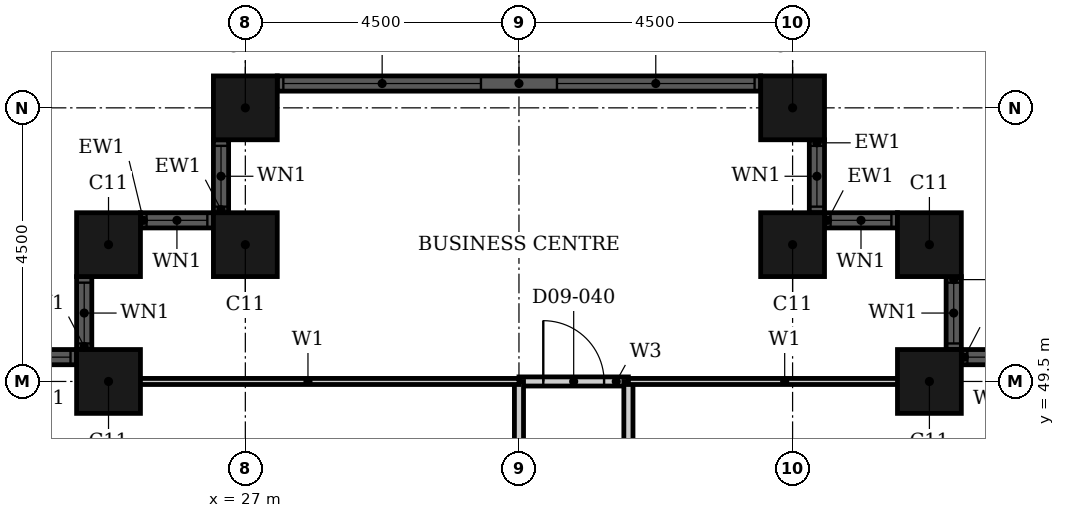
"""IFC4 building model, lengths in metres.
Left out: names, types, materials, properties, quantities, classifications, styles, units other than length and angle.
Written with IfcOpenShell. Run it as: python <this file> out.ifc"""

import sys

from ifc_helpers import new_model, si_unit, direction, frame, frame_2d, origin, origin_2d, place, context, subcontext, project, spatial, rectangle, hollow_rectangle, extrude, element, fill, save


model = new_model("IFC4")
c1 = context("Model", 3, precision=1e-05, world=origin(), true_north=direction((0.0, 1.0)))
c2 = subcontext(c1, "Body", "Model", "MODEL_VIEW")
j1 = project(units=[si_unit("LENGTHUNIT", "METRE"), si_unit("PLANEANGLEUNIT", "RADIAN")], contexts=[c1])
p1 = place(None, origin())
s1 = spatial("IfcSite", under=j1, at=p1, CompositionType="ELEMENT")
p2 = place(p1, origin())
s2 = spatial("IfcBuilding", under=s1, at=p2, CompositionType="ELEMENT")
p3 = place(p2, frame((0.0, 0.0, 44.4)))
s3 = spatial("IfcBuildingStorey", under=s2, at=p3, CompositionType="ELEMENT", Elevation=44.4)
for number, where, z_axis, x_axis in (
    (1, (38.25, 49.5, 0.0), (0.0, 0.0, 1.0), (1.0, 0.0, 0.0)),
    (2, (38.25, 51.75, 0.0), (0.0, 0.0, 1.0), (1.0, 0.0, 0.0)),
    (3, (36.0, 51.75, 0.0), (0.0, 0.0, 1.0), (1.0, 0.0, 0.0)),
    (4, (36.0, 54.0, 0.0), (0.0, 0.0, 1.0), (1.0, 0.0, 0.0)),
    (5, (27.0, 54.0, 0.0), (0.0, 0.0, 1.0), (1.0, 0.0, 0.0)),
    (6, (27.0, 51.75, 0.0), (0.0, 0.0, 1.0), (1.0, 0.0, 0.0)),
    (7, (24.75, 51.75, 0.0), (0.0, 0.0, 1.0), (1.0, 0.0, 0.0)),
    (8, (24.75, 49.5, 0.0), (0.0, 0.0, 1.0), (1.0, 0.0, 0.0)),
):
    element("IfcColumn", number, at=place(p3, frame(where, z_axis=z_axis, x_axis=x_axis)), inside=s3, PredefinedType="COLUMN", context=c2, shape_type="SweptSolid", body=[
        extrude(hollow_rectangle(XDim=1.05, YDim=1.05, WallThickness=0.034, at=origin_2d()), origin(), (0.0, 0.0, 1.0), 3.6),
    ])
p4 = place(p3, frame((39.975, 49.9, 0.0), z_axis=(0.0, 0.0, 1.0), x_axis=(-1.0, 0.0, 0.0)))
e9 = element("IfcWall", 9, at=p4, inside=s3, PredefinedType="SOLIDWALL", context=c2, shape_type="SweptSolid", body=[
    extrude(rectangle(XDim=1.2, YDim=0.25, at=frame_2d((0.6, 0.0))), origin(), (0.0, 0.0, 1.0), 3.6),
])
p5 = place(p4, frame((0.1, 0.0, 0.9)))
e10 = element("IfcOpeningElement", 10, at=p5, cuts=e9, PredefinedType="OPENING", context=c2, shape_type="SweptSolid", body=[
    extrude(rectangle(XDim=1.0, YDim=2.08, at=frame_2d((0.5, 1.04))), frame((0.0, 0.135, 0.0), z_axis=(0.0, -1.0, 0.0), x_axis=(1.0, 0.0, 0.0)), (0.0, 0.0, 1.0), 0.27),
])
p6 = place(p3, frame((38.65, 50.025, 0.0), z_axis=(0.0, 0.0, 1.0), x_axis=(0.0, 1.0, 0.0)))
e11 = element("IfcWall", 11, at=p6, inside=s3, PredefinedType="SOLIDWALL", context=c2, shape_type="SweptSolid", body=[
    extrude(rectangle(XDim=1.2, YDim=0.25, at=frame_2d((0.6, 0.0))), origin(), (0.0, 0.0, 1.0), 3.6),
])
p7 = place(p6, frame((0.1, 0.0, 0.9)))
e12 = element("IfcOpeningElement", 12, at=p7, cuts=e11, PredefinedType="OPENING", context=c2, shape_type="SweptSolid", body=[
    extrude(rectangle(XDim=1.0, YDim=2.08, at=frame_2d((0.5, 1.04))), frame((0.0, 0.135, 0.0), z_axis=(0.0, -1.0, 0.0), x_axis=(1.0, 0.0, 0.0)), (0.0, 0.0, 1.0), 0.27),
])
p8 = place(p3, frame((37.725, 52.15, 0.0), z_axis=(0.0, 0.0, 1.0), x_axis=(-1.0, 0.0, 0.0)))
e13 = element("IfcWall", 13, at=p8, inside=s3, PredefinedType="SOLIDWALL", context=c2, shape_type="SweptSolid", body=[
    extrude(rectangle(XDim=1.2, YDim=0.25, at=frame_2d((0.6, 0.0))), origin(), (0.0, 0.0, 1.0), 3.6),
])
p9 = place(p8, frame((0.1, 0.0, 0.9)))
e14 = element("IfcOpeningElement", 14, at=p9, cuts=e13, PredefinedType="OPENING", context=c2, shape_type="SweptSolid", body=[
    extrude(rectangle(XDim=1.0, YDim=2.08, at=frame_2d((0.5, 1.04))), frame((0.0, 0.135, 0.0), z_axis=(0.0, -1.0, 0.0), x_axis=(1.0, 0.0, 0.0)), (0.0, 0.0, 1.0), 0.27),
])
p10 = place(p3, frame((36.4, 52.275, 0.0), z_axis=(0.0, 0.0, 1.0), x_axis=(0.0, 1.0, 0.0)))
e15 = element("IfcWall", 15, at=p10, inside=s3, PredefinedType="SOLIDWALL", context=c2, shape_type="SweptSolid", body=[
    extrude(rectangle(XDim=1.2, YDim=0.25, at=frame_2d((0.6, 0.0))), origin(), (0.0, 0.0, 1.0), 3.6),
])
p11 = place(p10, frame((0.1, 0.0, 0.9)))
e16 = element("IfcOpeningElement", 16, at=p11, cuts=e15, PredefinedType="OPENING", context=c2, shape_type="SweptSolid", body=[
    extrude(rectangle(XDim=1.0, YDim=2.08, at=frame_2d((0.5, 1.04))), frame((0.0, 0.135, 0.0), z_axis=(0.0, -1.0, 0.0), x_axis=(1.0, 0.0, 0.0)), (0.0, 0.0, 1.0), 0.27),
])
p12 = place(p3, frame((35.475, 54.4, 0.0), z_axis=(0.0, 0.0, 1.0), x_axis=(-1.0, 0.0, 0.0)))
e17 = element("IfcWall", 17, at=p12, inside=s3, PredefinedType="SOLIDWALL", context=c2, shape_type="SweptSolid", body=[
    extrude(rectangle(XDim=7.95, YDim=0.25, at=frame_2d((3.975, 0.0))), origin(), (0.0, 0.0, 1.0), 3.6),
])
p13 = place(p12, frame((0.1, 0.0, 0.9)))
e18 = element("IfcOpeningElement", 18, at=p13, cuts=e17, PredefinedType="OPENING", context=c2, shape_type="SweptSolid", body=[
    extrude(rectangle(XDim=3.25, YDim=2.08, at=frame_2d((1.625, 1.04))), frame((0.0, 0.135, 0.0), z_axis=(0.0, -1.0, 0.0), x_axis=(1.0, 0.0, 0.0)), (0.0, 0.0, 1.0), 0.27),
])
p14 = place(p12, frame((4.6, 0.0, 0.9)))
e19 = element("IfcOpeningElement", 19, at=p14, cuts=e17, PredefinedType="OPENING", context=c2, shape_type="SweptSolid", body=[
    extrude(rectangle(XDim=3.25, YDim=2.08, at=frame_2d((1.625, 1.04))), frame((0.0, 0.135, 0.0), z_axis=(0.0, -1.0, 0.0), x_axis=(1.0, 0.0, 0.0)), (0.0, 0.0, 1.0), 0.27),
])
p15 = place(p3, frame((26.6, 53.475, 0.0), z_axis=(0.0, 0.0, 1.0), x_axis=(0.0, -1.0, 0.0)))
e20 = element("IfcWall", 20, at=p15, inside=s3, PredefinedType="SOLIDWALL", context=c2, shape_type="SweptSolid", body=[
    extrude(rectangle(XDim=1.2, YDim=0.25, at=frame_2d((0.6, 0.0))), origin(), (0.0, 0.0, 1.0), 3.6),
])
p16 = place(p15, frame((0.1, 0.0, 0.9)))
e21 = element("IfcOpeningElement", 21, at=p16, cuts=e20, PredefinedType="OPENING", context=c2, shape_type="SweptSolid", body=[
    extrude(rectangle(XDim=1.0, YDim=2.08, at=frame_2d((0.5, 1.04))), frame((0.0, 0.135, 0.0), z_axis=(0.0, -1.0, 0.0), x_axis=(1.0, 0.0, 0.0)), (0.0, 0.0, 1.0), 0.27),
])
p17 = place(p3, frame((26.475, 52.15, 0.0), z_axis=(0.0, 0.0, 1.0), x_axis=(-1.0, 0.0, 0.0)))
e22 = element("IfcWall", 22, at=p17, inside=s3, PredefinedType="SOLIDWALL", context=c2, shape_type="SweptSolid", body=[
    extrude(rectangle(XDim=1.2, YDim=0.25, at=frame_2d((0.6, 0.0))), origin(), (0.0, 0.0, 1.0), 3.6),
])
p18 = place(p17, frame((0.1, 0.0, 0.9)))
e23 = element("IfcOpeningElement", 23, at=p18, cuts=e22, PredefinedType="OPENING", context=c2, shape_type="SweptSolid", body=[
    extrude(rectangle(XDim=1.0, YDim=2.08, at=frame_2d((0.5, 1.04))), frame((0.0, 0.135, 0.0), z_axis=(0.0, -1.0, 0.0), x_axis=(1.0, 0.0, 0.0)), (0.0, 0.0, 1.0), 0.27),
])
p19 = place(p3, frame((24.35, 51.225, 0.0), z_axis=(0.0, 0.0, 1.0), x_axis=(0.0, -1.0, 0.0)))
e24 = element("IfcWall", 24, at=p19, inside=s3, PredefinedType="SOLIDWALL", context=c2, shape_type="SweptSolid", body=[
    extrude(rectangle(XDim=1.2, YDim=0.25, at=frame_2d((0.6, 0.0))), origin(), (0.0, 0.0, 1.0), 3.6),
])
p20 = place(p19, frame((0.1, 0.0, 0.9)))
e25 = element("IfcOpeningElement", 25, at=p20, cuts=e24, PredefinedType="OPENING", context=c2, shape_type="SweptSolid", body=[
    extrude(rectangle(XDim=1.0, YDim=2.08, at=frame_2d((0.5, 1.04))), frame((0.0, 0.135, 0.0), z_axis=(0.0, -1.0, 0.0), x_axis=(1.0, 0.0, 0.0)), (0.0, 0.0, 1.0), 0.27),
])
p21 = place(p3, frame((24.225, 49.9, 0.0), z_axis=(0.0, 0.0, 1.0), x_axis=(-1.0, 0.0, 0.0)))
e26 = element("IfcWall", 26, at=p21, inside=s3, PredefinedType="SOLIDWALL", context=c2, shape_type="SweptSolid", body=[
    extrude(rectangle(XDim=1.2, YDim=0.25, at=frame_2d((0.6, 0.0))), origin(), (0.0, 0.0, 1.0), 3.6),
])
p22 = place(p21, frame((0.1, 0.0, 0.9)))
e27 = element("IfcOpeningElement", 27, at=p22, cuts=e26, PredefinedType="OPENING", context=c2, shape_type="SweptSolid", body=[
    extrude(rectangle(XDim=1.0, YDim=2.08, at=frame_2d((0.5, 1.04))), frame((0.0, 0.135, 0.0), z_axis=(0.0, -1.0, 0.0), x_axis=(1.0, 0.0, 0.0)), (0.0, 0.0, 1.0), 0.27),
])
p23 = place(p3, frame((31.5, 49.5, 0.0), z_axis=(0.0, 0.0, 1.0), x_axis=(1.0, 0.0, 0.0)))
e28 = element("IfcWall", 28, at=p23, inside=s3, PredefinedType="PARTITIONING", context=c2, shape_type="SweptSolid", body=[
    extrude(rectangle(XDim=1.8, YDim=0.15, at=frame_2d((0.9, 0.0))), origin(), (0.0, 0.0, 1.0), 3.2),
])
p24 = place(p23, frame((0.4, 0.0, 0.0)))
e29 = element("IfcOpeningElement", 29, at=p24, cuts=e28, PredefinedType="OPENING", context=c2, shape_type="SweptSolid", body=[
    extrude(rectangle(XDim=1.0, YDim=2.1, at=frame_2d((0.5, 1.05))), frame((0.0, 0.085, 0.0), z_axis=(0.0, -1.0, 0.0), x_axis=(1.0, 0.0, 0.0)), (0.0, 0.0, 1.0), 0.17),
])
p25 = place(p3, frame((31.5, 33.3, 0.0), z_axis=(0.0, 0.0, 1.0), x_axis=(0.0, 1.0, 0.0)))
e30 = element("IfcWall", 30, at=p25, inside=s3, PredefinedType="PARTITIONING", context=c2, shape_type="SweptSolid", body=[
    extrude(rectangle(XDim=16.2, YDim=0.15, at=frame_2d((8.1, 0.0))), origin(), (0.0, 0.0, 1.0), 2.48),
])
p26 = place(p25, frame((8.95, 0.0, 0.0)))
e31 = element("IfcOpeningElement", 31, at=p26, cuts=e30, PredefinedType="OPENING", context=c2, shape_type="SweptSolid", body=[
    extrude(rectangle(XDim=1.0, YDim=2.1, at=frame_2d((0.5, 1.05))), frame((0.0, 0.085, 0.0), z_axis=(0.0, -1.0, 0.0), x_axis=(1.0, 0.0, 0.0)), (0.0, 0.0, 1.0), 0.17),
])
p27 = place(p3, frame((33.3, 33.3, 0.0), z_axis=(0.0, 0.0, 1.0), x_axis=(0.0, 1.0, 0.0)))
e32 = element("IfcWall", 32, at=p27, inside=s3, PredefinedType="PARTITIONING", context=c2, shape_type="SweptSolid", body=[
    extrude(rectangle(XDim=16.2, YDim=0.15, at=frame_2d((8.1, 0.0))), origin(), (0.0, 0.0, 1.0), 3.2),
])
p28 = place(p27, frame((8.95, 0.0, 0.0)))
e33 = element("IfcOpeningElement", 33, at=p28, cuts=e32, PredefinedType="OPENING", context=c2, shape_type="SweptSolid", body=[
    extrude(rectangle(XDim=1.0, YDim=2.1, at=frame_2d((0.5, 1.05))), frame((0.0, 0.085, 0.0), z_axis=(0.0, -1.0, 0.0), x_axis=(1.0, 0.0, 0.0)), (0.0, 0.0, 1.0), 0.17),
])
p29 = place(p3, frame((33.3, 49.5, 0.0), z_axis=(0.0, 0.0, 1.0), x_axis=(1.0, 0.0, 0.0)))
e34 = element("IfcWall", 34, at=p29, inside=s3, PredefinedType="PARTITIONING", context=c2, shape_type="SweptSolid", body=[
    extrude(rectangle(XDim=5.14, YDim=0.1, at=frame_2d((2.57, 0.0))), origin(), (0.0, 0.0, 1.0), 3.2),
])
p30 = place(p3, frame((24.56, 49.5, 0.0), z_axis=(0.0, 0.0, 1.0), x_axis=(1.0, 0.0, 0.0)))
e35 = element("IfcWall", 35, at=p30, inside=s3, PredefinedType="PARTITIONING", context=c2, shape_type="SweptSolid", body=[
    extrude(rectangle(XDim=6.94, YDim=0.1, at=frame_2d((3.47, 0.0))), origin(), (0.0, 0.0, 1.0), 3.2),
])
p31 = place(p5, origin())
e36 = element("IfcWindow", 36, at=p31, inside=s3, PartitioningType="SINGLE_PANEL", PredefinedType="WINDOW", context=c2, shape_type="SweptSolid", body=[
    extrude(rectangle(XDim=1.0, YDim=2.08, at=frame_2d((0.5, 1.04))), frame((0.0, 0.03, 0.0), z_axis=(0.0, -1.0, 0.0), x_axis=(1.0, 0.0, 0.0)), (0.0, 0.0, 1.0), 0.06),
])
fill(e10, e36)
p32 = place(p7, origin())
e37 = element("IfcWindow", 37, at=p32, inside=s3, PartitioningType="SINGLE_PANEL", PredefinedType="WINDOW", context=c2, shape_type="SweptSolid", body=[
    extrude(rectangle(XDim=1.0, YDim=2.08, at=frame_2d((0.5, 1.04))), frame((0.0, 0.03, 0.0), z_axis=(0.0, -1.0, 0.0), x_axis=(1.0, 0.0, 0.0)), (0.0, 0.0, 1.0), 0.06),
])
fill(e12, e37)
p33 = place(p9, origin())
e38 = element("IfcWindow", 38, at=p33, inside=s3, PartitioningType="SINGLE_PANEL", PredefinedType="WINDOW", context=c2, shape_type="SweptSolid", body=[
    extrude(rectangle(XDim=1.0, YDim=2.08, at=frame_2d((0.5, 1.04))), frame((0.0, 0.03, 0.0), z_axis=(0.0, -1.0, 0.0), x_axis=(1.0, 0.0, 0.0)), (0.0, 0.0, 1.0), 0.06),
])
fill(e14, e38)
p34 = place(p11, origin())
e39 = element("IfcWindow", 39, at=p34, inside=s3, PartitioningType="SINGLE_PANEL", PredefinedType="WINDOW", context=c2, shape_type="SweptSolid", body=[
    extrude(rectangle(XDim=1.0, YDim=2.08, at=frame_2d((0.5, 1.04))), frame((0.0, 0.03, 0.0), z_axis=(0.0, -1.0, 0.0), x_axis=(1.0, 0.0, 0.0)), (0.0, 0.0, 1.0), 0.06),
])
fill(e16, e39)
p35 = place(p13, origin())
e40 = element("IfcWindow", 40, at=p35, inside=s3, PartitioningType="SINGLE_PANEL", PredefinedType="WINDOW", context=c2, shape_type="SweptSolid", body=[
    extrude(rectangle(XDim=3.25, YDim=2.08, at=frame_2d((1.625, 1.04))), frame((0.0, 0.03, 0.0), z_axis=(0.0, -1.0, 0.0), x_axis=(1.0, 0.0, 0.0)), (0.0, 0.0, 1.0), 0.06),
])
fill(e18, e40)
p36 = place(p14, origin())
e41 = element("IfcWindow", 41, at=p36, inside=s3, PartitioningType="SINGLE_PANEL", PredefinedType="WINDOW", context=c2, shape_type="SweptSolid", body=[
    extrude(rectangle(XDim=3.25, YDim=2.08, at=frame_2d((1.625, 1.04))), frame((0.0, 0.03, 0.0), z_axis=(0.0, -1.0, 0.0), x_axis=(1.0, 0.0, 0.0)), (0.0, 0.0, 1.0), 0.06),
])
fill(e19, e41)
p37 = place(p16, origin())
e42 = element("IfcWindow", 42, at=p37, inside=s3, PartitioningType="SINGLE_PANEL", PredefinedType="WINDOW", context=c2, shape_type="SweptSolid", body=[
    extrude(rectangle(XDim=1.0, YDim=2.08, at=frame_2d((0.5, 1.04))), frame((0.0, 0.03, 0.0), z_axis=(0.0, -1.0, 0.0), x_axis=(1.0, 0.0, 0.0)), (0.0, 0.0, 1.0), 0.06),
])
fill(e21, e42)
p38 = place(p18, origin())
e43 = element("IfcWindow", 43, at=p38, inside=s3, PartitioningType="SINGLE_PANEL", PredefinedType="WINDOW", context=c2, shape_type="SweptSolid", body=[
    extrude(rectangle(XDim=1.0, YDim=2.08, at=frame_2d((0.5, 1.04))), frame((0.0, 0.03, 0.0), z_axis=(0.0, -1.0, 0.0), x_axis=(1.0, 0.0, 0.0)), (0.0, 0.0, 1.0), 0.06),
])
fill(e23, e43)
p39 = place(p20, origin())
e44 = element("IfcWindow", 44, at=p39, inside=s3, PartitioningType="SINGLE_PANEL", PredefinedType="WINDOW", context=c2, shape_type="SweptSolid", body=[
    extrude(rectangle(XDim=1.0, YDim=2.08, at=frame_2d((0.5, 1.04))), frame((0.0, 0.03, 0.0), z_axis=(0.0, -1.0, 0.0), x_axis=(1.0, 0.0, 0.0)), (0.0, 0.0, 1.0), 0.06),
])
fill(e25, e44)
p40 = place(p22, origin())
e45 = element("IfcWindow", 45, at=p40, inside=s3, PartitioningType="SINGLE_PANEL", PredefinedType="WINDOW", context=c2, shape_type="SweptSolid", body=[
    extrude(rectangle(XDim=1.0, YDim=2.08, at=frame_2d((0.5, 1.04))), frame((0.0, 0.03, 0.0), z_axis=(0.0, -1.0, 0.0), x_axis=(1.0, 0.0, 0.0)), (0.0, 0.0, 1.0), 0.06),
])
fill(e27, e45)
p41 = place(p24, origin())
e46 = element("IfcDoor", 46, at=p41, inside=s3, OperationType="SINGLE_SWING_RIGHT", PredefinedType="DOOR", context=c2, shape_type="SweptSolid", body=[
    extrude(rectangle(XDim=1.0, YDim=2.1, at=frame_2d((0.5, 1.05))), frame((0.0, 0.025, 0.0), z_axis=(0.0, -1.0, 0.0), x_axis=(1.0, 0.0, 0.0)), (0.0, 0.0, 1.0), 0.05),
])
fill(e29, e46)
save(model, sys.argv[1])
